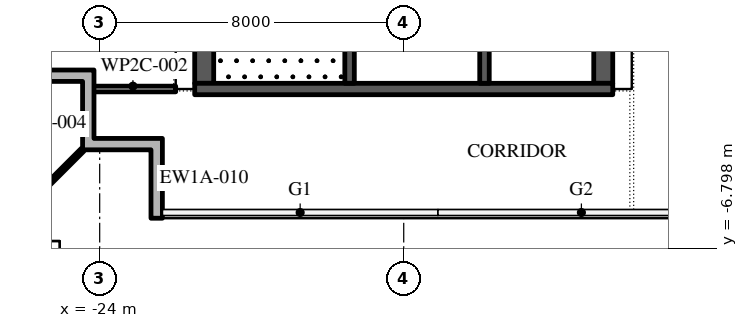
"""IFC4 building model, lengths in metres.
Left out: names, types, materials, properties, quantities, classifications, styles, units other than length and angle.
Written with IfcOpenShell. Run it as: python <this file> out.ifc"""

import sys

from ifc_helpers import new_model, si_unit, direction, frame, frame_2d, origin, place, context, subcontext, project, spatial, polyline, rectangle, outline, extrude, element, save


model = new_model("IFC4")
c1 = context("Model", 3, precision=1e-05, world=origin(), true_north=direction((0.0, 1.0)))
c2 = subcontext(c1, "Body", "Model", "MODEL_VIEW")
j1 = project(units=[si_unit("LENGTHUNIT", "METRE"), si_unit("PLANEANGLEUNIT", "RADIAN")], contexts=[c1])
p1 = place(None, origin())
s1 = spatial("IfcSite", under=j1, at=p1, CompositionType="ELEMENT")
p2 = place(p1, origin())
s2 = spatial("IfcBuilding", under=s1, at=p2, CompositionType="ELEMENT")
p3 = place(p2, frame((0.0, 0.0, 303.0)))
s3 = spatial("IfcBuildingStorey", under=s2, at=p3, CompositionType="ELEMENT", Elevation=303.0)
p4 = place(p3, origin())
e1 = element("IfcWall", 1, at=p4, inside=s3, PredefinedType="STANDARD", context=c2, shape_type="SweptSolid", body=[
    extrude(outline(polyline([(-22.65, -4.2), (-24.45, -4.2), (-24.45, -2.4), (-25.95, -2.4), (-25.95, -2.1), (-24.15, -2.1), (-24.15, -3.9), (-22.35, -3.9), (-22.35, -6.0), (-22.65, -6.0), (-22.65, -4.2)])), origin(), (0.0, 0.0, 1.0), 5.8),
])
p5 = place(p3, frame((-24.45, -4.2, 0.0), z_axis=(0.0, 0.0, 1.0), x_axis=(-0.707106781187, -0.707106781187, 0.0)))
e2 = element("IfcWall", 2, at=p5, inside=s3, PredefinedType="STANDARD", context=c2, shape_type="SweptSolid", body=[
    extrude(rectangle(XDim=2.667, YDim=0.1, at=frame_2d((1.333, 0.0))), origin(), (0.0, 0.0, 1.0), 5.8),
])
p6 = place(p3, frame((-21.25, -2.45, 0.0), z_axis=(0.0, 0.0, 1.0), x_axis=(0.0, 1.0, 0.0)))
e3 = element("IfcWall", 3, at=p6, inside=s3, PredefinedType="SHEAR", context=c2, shape_type="SweptSolid", body=[
    extrude(rectangle(XDim=27.9, YDim=0.5, at=frame_2d((13.95, 0.0))), origin(), (0.0, 0.0, 1.0), 5.8),
])
p7 = place(p6, frame((5.05, 0.0, 0.0)))
e4 = element("IfcOpeningElement", 4, at=p7, cuts=e3, PredefinedType="OPENING", context=c2, shape_type="SweptSolid", body=[
    extrude(rectangle(XDim=1.2, YDim=2.1, at=frame_2d((0.6, 1.05))), frame((0.0, 0.26, 0.0), z_axis=(0.0, -1.0, 0.0), x_axis=(1.0, 0.0, 0.0)), (0.0, 0.0, 1.0), 0.52),
])
p8 = place(p6, frame((21.65, 0.0, 0.0)))
e5 = element("IfcOpeningElement", 5, at=p8, cuts=e3, PredefinedType="OPENING", context=c2, shape_type="SweptSolid", body=[
    extrude(rectangle(XDim=1.2, YDim=2.1, at=frame_2d((0.6, 1.05))), frame((0.0, 0.26, 0.0), z_axis=(0.0, -1.0, 0.0), x_axis=(1.0, 0.0, 0.0)), (0.0, 0.0, 1.0), 0.52),
])
p9 = place(p3, frame((-10.75, -2.45, 0.0), z_axis=(0.0, 0.0, 1.0), x_axis=(0.0, 1.0, 0.0)))
e6 = element("IfcWall", 6, at=p9, inside=s3, PredefinedType="SHEAR", context=c2, shape_type="SweptSolid", body=[
    extrude(rectangle(XDim=27.9, YDim=0.5, at=frame_2d((13.95, 0.0))), origin(), (0.0, 0.0, 1.0), 5.8),
])
p10 = place(p9, frame((23.65, 0.0, 0.0)))
e7 = element("IfcOpeningElement", 7, at=p10, cuts=e6, PredefinedType="OPENING", context=c2, shape_type="SweptSolid", body=[
    extrude(rectangle(XDim=2.4, YDim=2.1, at=frame_2d((1.2, 1.05))), frame((0.0, 0.26, 0.0), z_axis=(0.0, -1.0, 0.0), x_axis=(1.0, 0.0, 0.0)), (0.0, 0.0, 1.0), 0.52),
])
p11 = place(p9, frame((1.087, 0.0, 0.0)))
e8 = element("IfcOpeningElement", 8, at=p11, cuts=e6, PredefinedType="OPENING", context=c2, shape_type="SweptSolid", body=[
    extrude(rectangle(XDim=0.9, YDim=2.1, at=frame_2d((0.45, 1.05))), frame((0.0, 0.26, 0.0), z_axis=(0.0, -1.0, 0.0), x_axis=(1.0, 0.0, 0.0)), (0.0, 0.0, 1.0), 0.52),
])
p12 = place(p9, frame((4.262, 0.0, 0.0)))
e9 = element("IfcOpeningElement", 9, at=p12, cuts=e6, PredefinedType="OPENING", context=c2, shape_type="SweptSolid", body=[
    extrude(rectangle(XDim=1.0, YDim=2.1, at=frame_2d((0.5, 1.05))), frame((0.0, 0.26, 0.0), z_axis=(0.0, -1.0, 0.0), x_axis=(1.0, 0.0, 0.0)), (0.0, 0.0, 1.0), 0.52),
])
p13 = place(p3, frame((-21.5, -2.6, 0.0), z_axis=(0.0, 0.0, 1.0), x_axis=(1.0, 0.0, 0.0)))
e10 = element("IfcWall", 10, at=p13, inside=s3, PredefinedType="SHEAR", context=c2, shape_type="SweptSolid", body=[
    extrude(rectangle(XDim=11.0, YDim=0.3, at=frame_2d((5.5, 0.0))), origin(), (0.0, 0.0, 1.0), 5.8),
])
p14 = place(p3, frame((-17.425, -2.45, 0.0), z_axis=(0.0, 0.0, 1.0), x_axis=(0.0, 1.0, 0.0)))
e11 = element("IfcWall", 11, at=p14, inside=s3, PredefinedType="SHEAR", context=c2, shape_type="SweptSolid", body=[
    extrude(rectangle(XDim=6.3, YDim=0.25, at=frame_2d((3.15, 0.0))), origin(), (0.0, 0.0, 1.0), 5.8),
])
p15 = place(p14, frame((5.05, 0.0, 0.0)))
e12 = element("IfcOpeningElement", 12, at=p15, cuts=e11, PredefinedType="OPENING", context=c2, shape_type="SweptSolid", body=[
    extrude(rectangle(XDim=1.2, YDim=2.1, at=frame_2d((0.6, 1.05))), frame((0.0, 0.135, 0.0), z_axis=(0.0, -1.0, 0.0), x_axis=(1.0, 0.0, 0.0)), (0.0, 0.0, 1.0), 0.27),
])
p16 = place(p3, frame((-13.875, -2.45, 0.0), z_axis=(0.0, 0.0, 1.0), x_axis=(0.0, 1.0, 0.0)))
e13 = element("IfcWall", 13, at=p16, inside=s3, PredefinedType="SHEAR", context=c2, shape_type="SweptSolid", body=[
    extrude(rectangle(XDim=21.3, YDim=0.25, at=frame_2d((10.65, 0.0))), origin(), (0.0, 0.0, 1.0), 5.8),
])
p17 = place(p16, frame((11.357, 0.0, 0.0)))
e14 = element("IfcOpeningElement", 14, at=p17, cuts=e13, PredefinedType="OPENING", context=c2, shape_type="SweptSolid", body=[
    extrude(rectangle(XDim=0.9, YDim=2.1, at=frame_2d((0.45, 1.05))), frame((0.0, 0.135, 0.0), z_axis=(0.0, -1.0, 0.0), x_axis=(1.0, 0.0, 0.0)), (0.0, 0.0, 1.0), 0.27),
])
p18 = place(p16, frame((6.971, 0.0, 0.0)))
e15 = element("IfcOpeningElement", 15, at=p18, cuts=e13, PredefinedType="OPENING", context=c2, shape_type="SweptSolid", body=[
    extrude(rectangle(XDim=1.1, YDim=2.1, at=frame_2d((0.55, 1.05))), frame((0.0, 0.135, 0.0), z_axis=(0.0, -1.0, 0.0), x_axis=(1.0, 0.0, 0.0)), (0.0, 0.0, 1.0), 0.27),
])
p19 = place(p16, frame((15.543, 0.0, 0.0)))
e16 = element("IfcOpeningElement", 16, at=p19, cuts=e13, PredefinedType="OPENING", context=c2, shape_type="SweptSolid", body=[
    extrude(rectangle(XDim=1.1, YDim=2.1, at=frame_2d((0.55, 1.05))), frame((0.0, 0.135, 0.0), z_axis=(0.0, -1.0, 0.0), x_axis=(1.0, 0.0, 0.0)), (0.0, 0.0, 1.0), 0.27),
])
p20 = place(p16, frame((17.686, 0.0, 0.0)))
e17 = element("IfcOpeningElement", 17, at=p20, cuts=e13, PredefinedType="OPENING", context=c2, shape_type="SweptSolid", body=[
    extrude(rectangle(XDim=1.1, YDim=2.1, at=frame_2d((0.55, 1.05))), frame((0.0, 0.135, 0.0), z_axis=(0.0, -1.0, 0.0), x_axis=(1.0, 0.0, 0.0)), (0.0, 0.0, 1.0), 0.27),
])
p21 = place(p16, frame((19.829, 0.0, 0.0)))
e18 = element("IfcOpeningElement", 18, at=p21, cuts=e13, PredefinedType="OPENING", context=c2, shape_type="SweptSolid", body=[
    extrude(rectangle(XDim=1.1, YDim=2.1, at=frame_2d((0.55, 1.05))), frame((0.0, 0.135, 0.0), z_axis=(0.0, -1.0, 0.0), x_axis=(1.0, 0.0, 0.0)), (0.0, 0.0, 1.0), 0.27),
])
p22 = place(p3, frame((-24.25, -2.6, 0.0), z_axis=(0.0, 0.0, 1.0), x_axis=(1.0, 0.0, 0.0)))
e19 = element("IfcWall", 19, at=p22, inside=s3, PredefinedType="PARTITIONING", context=c2, shape_type="SweptSolid", body=[
    extrude(rectangle(XDim=2.25, YDim=0.15, at=frame_2d((1.125, 0.0))), origin(), (0.0, 0.0, 1.0), 5.8),
])
save(model, sys.argv[1])
